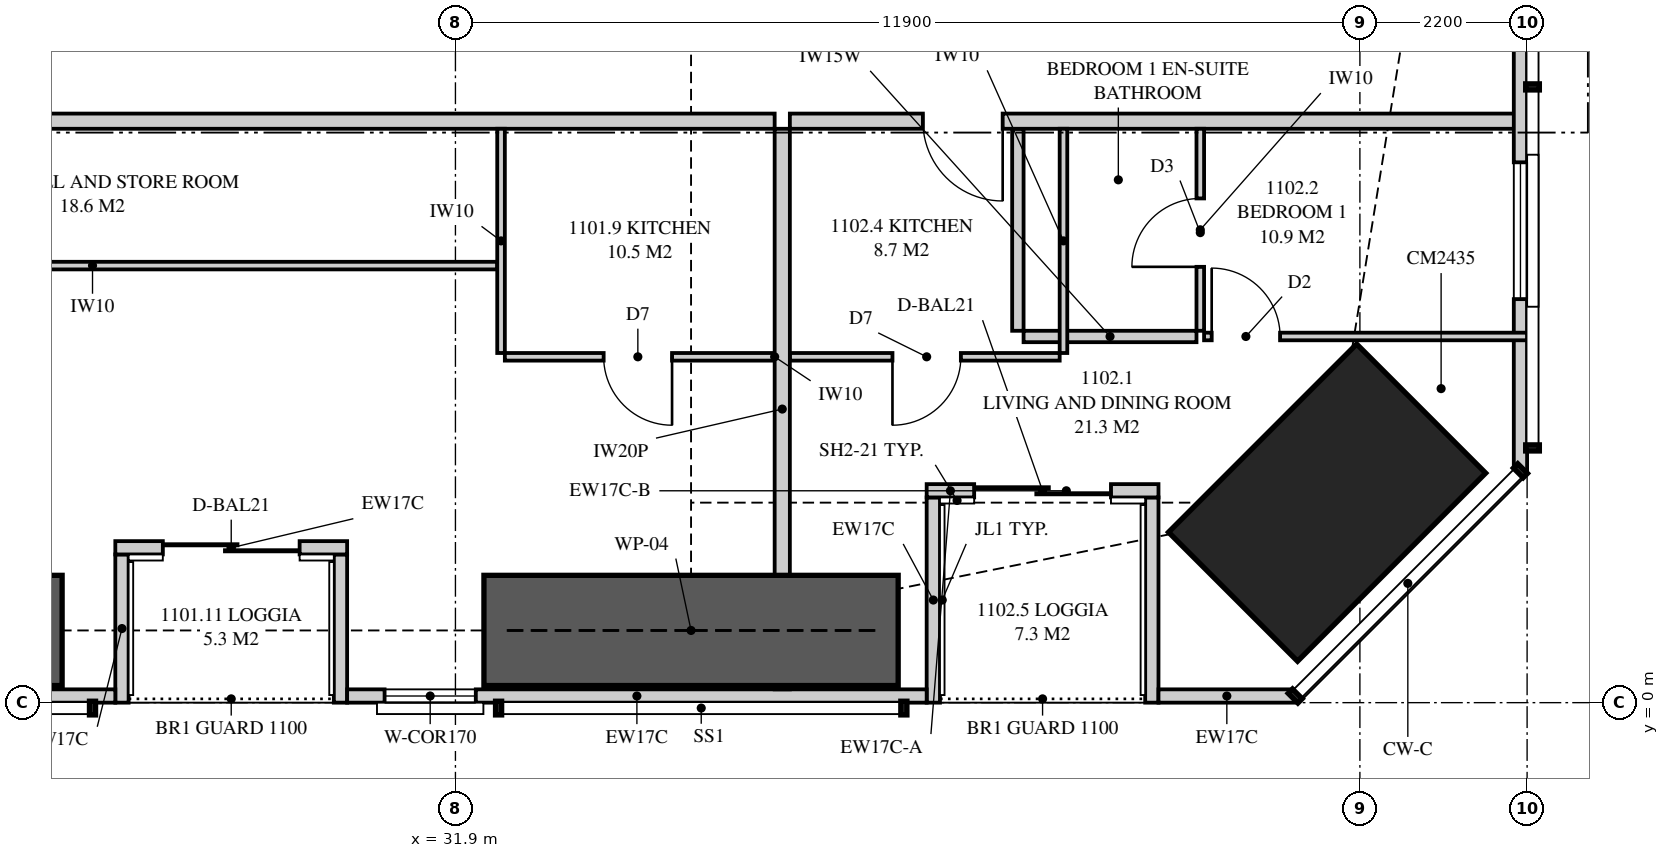
"""IFC4 building model, lengths in metres.
Left out: names, types, materials, properties, quantities, classifications, styles, units other than length and angle.
Written with IfcOpenShell. Run it as: python <this file> out.ifc"""

import sys

from ifc_helpers import new_model, si_unit, direction, frame, frame_2d, origin, origin_2d, place, context, subcontext, project, spatial, polyline, rectangle, outline, extrude, element, fill, save


model = new_model("IFC4")
c1 = context("Model", 3, precision=1e-05, world=origin(), true_north=direction((0.0, 1.0)))
c2 = subcontext(c1, "Body", "Model", "MODEL_VIEW")
j1 = project(units=[si_unit("LENGTHUNIT", "METRE"), si_unit("PLANEANGLEUNIT", "RADIAN")], contexts=[c1])
p1 = place(None, origin())
s1 = spatial("IfcSite", under=j1, at=p1, CompositionType="ELEMENT")
p2 = place(p1, origin())
s2 = spatial("IfcBuilding", under=s1, at=p2, CompositionType="ELEMENT")
p3 = place(p2, frame((0.0, 0.0, 44.45)))
s3 = spatial("IfcBuildingStorey", under=s2, at=p3, CompositionType="ELEMENT", Elevation=44.45)
p4 = place(p3, frame((43.369, 2.631, 0.0), z_axis=(0.0, 0.0, 1.0), x_axis=(-0.707106781187, 0.707106781187, 0.0)))
e1 = element("IfcColumn", 1, at=p4, inside=s3, PredefinedType="COLUMN", context=c2, shape_type="SweptSolid", body=[
    extrude(rectangle(XDim=2.4, YDim=3.5, at=origin_2d()), origin(), (0.0, 0.0, 1.0), 3.35),
])
p5 = place(p3, frame((5.051, 0.087, 0.0), z_axis=(0.0, 0.0, 1.0), x_axis=(1.0, 0.0, 0.0)))
e2 = element("IfcWall", 2, at=p5, inside=s3, PredefinedType="SOLIDWALL", context=c2, shape_type="SweptSolid", body=[
    extrude(outline(polyline([(0.0, 0.0), (22.374, 0.0), (22.374, 2.15), (7.949, 2.15), (7.949, 3.11), (7.793, 3.11), (7.793, 2.15), (7.745, 2.15), (7.745, 3.11), (0.0, 3.11), (0.0, 0.0)])), frame((0.0, 0.087, 0.0), z_axis=(0.0, -1.0, 0.0), x_axis=(1.0, 0.0, 0.0)), (0.0, 0.0, 1.0), 0.175),
])
p6 = place(p5, frame((3.319, 0.0, 0.4)))
e3 = element("IfcOpeningElement", 3, at=p6, cuts=e2, PredefinedType="OPENING", context=c2, shape_type="SweptSolid", body=[
    extrude(rectangle(XDim=1.8, YDim=1.7, at=frame_2d((0.9, 0.85))), frame((0.0, 0.097, 0.0), z_axis=(0.0, -1.0, 0.0), x_axis=(1.0, 0.0, 0.0)), (0.0, 0.0, 1.0), 0.195),
])
p7 = place(p5, frame((10.806, 0.0, 0.4)))
e4 = element("IfcOpeningElement", 4, at=p7, cuts=e2, PredefinedType="OPENING", context=c2, shape_type="SweptSolid", body=[
    extrude(rectangle(XDim=1.8, YDim=1.7, at=frame_2d((0.9, 0.85))), frame((0.0, 0.097, 0.0), z_axis=(0.0, -1.0, 0.0), x_axis=(1.0, 0.0, 0.0)), (0.0, 0.0, 1.0), 0.195),
])
p8 = place(p5, frame((13.974, 0.0, 0.4)))
e5 = element("IfcOpeningElement", 5, at=p8, cuts=e2, PredefinedType="OPENING", context=c2, shape_type="SweptSolid", body=[
    extrude(rectangle(XDim=1.8, YDim=1.7, at=frame_2d((0.9, 0.85))), frame((0.0, 0.097, 0.0), z_axis=(0.0, -1.0, 0.0), x_axis=(1.0, 0.0, 0.0)), (0.0, 0.0, 1.0), 0.195),
])
p9 = place(p3, frame((30.475, 0.087, 0.0), z_axis=(0.0, 0.0, 1.0), x_axis=(1.0, 0.0, 0.0)))
e6 = element("IfcWall", 6, at=p9, inside=s3, PredefinedType="SOLIDWALL", context=c2, shape_type="SweptSolid", body=[
    extrude(outline(polyline([(0.0, 0.0), (7.625, 0.0), (7.625, 3.11), (4.729, 3.11), (4.729, 2.15), (4.681, 2.15), (4.681, 3.11), (4.525, 3.11), (4.525, 2.15), (0.0, 2.15), (0.0, 0.0)])), frame((0.0, 0.087, 0.0), z_axis=(0.0, -1.0, 0.0), x_axis=(1.0, 0.0, 0.0)), (0.0, 0.0, 1.0), 0.175),
])
p10 = place(p9, frame((0.493, 0.0, 0.4)))
e7 = element("IfcOpeningElement", 7, at=p10, cuts=e6, PredefinedType="OPENING", context=c2, shape_type="SweptSolid", body=[
    extrude(rectangle(XDim=1.2, YDim=1.7, at=frame_2d((0.6, 0.85))), frame((0.0, 0.097, 0.0), z_axis=(0.0, -1.0, 0.0), x_axis=(1.0, 0.0, 0.0)), (0.0, 0.0, 1.0), 0.195),
])
p11 = place(p3, frame((41.15, 0.087, 0.0), z_axis=(0.0, 0.0, 1.0), x_axis=(1.0, 0.0, 0.0)))
e8 = element("IfcWall", 8, at=p11, inside=s3, PredefinedType="SOLIDWALL", context=c2, shape_type="SweptSolid", body=[
    extrude(rectangle(XDim=1.799, YDim=0.175, at=frame_2d((0.899, 0.0))), origin(), (0.0, 0.0, 1.0), 3.11),
])
p12 = place(p3, frame((27.425, 2.038, 0.0), z_axis=(0.0, 0.0, 1.0), x_axis=(1.0, 0.0, 0.0)))
e9 = element("IfcWall", 9, at=p12, inside=s3, PredefinedType="SOLIDWALL", context=c2, shape_type="SweptSolid", body=[
    extrude(rectangle(XDim=3.05, YDim=0.175, at=frame_2d((1.525, 0.0))), origin(), (0.0, 0.0, 1.0), 3.11),
])
p13 = place(p12, frame((0.625, 0.0, 0.0)))
e10 = element("IfcOpeningElement", 10, at=p13, cuts=e9, PredefinedType="OPENING", context=c2, shape_type="SweptSolid", body=[
    extrude(rectangle(XDim=1.8, YDim=2.1, at=frame_2d((0.9, 1.05))), frame((0.0, 0.097, 0.0), z_axis=(0.0, -1.0, 0.0), x_axis=(1.0, 0.0, 0.0)), (0.0, 0.0, 1.0), 0.195),
])
for number, where, z_axis, x_axis in (
    (11, (27.512, 0.0, 0.0), (0.0, 0.0, 1.0), (0.0, 1.0, 0.0)),
    (12, (30.387, 0.0, 0.0), (0.0, 0.0, 1.0), (0.0, 1.0, 0.0)),
):
    element("IfcWall", number, at=place(p3, frame(where, z_axis=z_axis, x_axis=x_axis)), inside=s3, PredefinedType="SOLIDWALL", context=c2, shape_type="SweptSolid", body=[
        extrude(outline(polyline([(0.0, 0.0), (1.95, 0.0), (1.95, 3.11), (1.75, 3.11), (1.75, 2.15), (0.15, 2.15), (0.15, 3.11), (0.0, 3.11), (0.0, 0.0)])), frame((0.0, 0.087, 0.0), z_axis=(0.0, -1.0, 0.0), x_axis=(1.0, 0.0, 0.0)), (0.0, 0.0, 1.0), 0.175),
    ])
p14 = place(p3, frame((38.1, 2.788, 0.0), z_axis=(0.0, 0.0, 1.0), x_axis=(1.0, 0.0, 0.0)))
e13 = element("IfcWall", 13, at=p14, inside=s3, PredefinedType="SOLIDWALL", context=c2, shape_type="SweptSolid", body=[
    extrude(rectangle(XDim=0.625, YDim=0.175, at=frame_2d((0.312, 0.0))), origin(), (0.0, 0.0, 1.0), 2.51),
])
p15 = place(p3, frame((38.725, 2.788, 0.0), z_axis=(0.0, 0.0, 1.0), x_axis=(1.0, 0.0, 0.0)))
e14 = element("IfcWall", 14, at=p15, inside=s3, PredefinedType="SOLIDWALL", context=c2, shape_type="SweptSolid", body=[
    extrude(rectangle(XDim=2.425, YDim=0.175, at=frame_2d((1.212, 0.0))), origin(), (0.0, 0.0, 1.0), 2.15),
])
p16 = place(p15, origin())
e15 = element("IfcOpeningElement", 15, at=p16, cuts=e14, PredefinedType="OPENING", context=c2, shape_type="SweptSolid", body=[
    extrude(rectangle(XDim=1.8, YDim=2.1, at=frame_2d((0.9, 1.05))), frame((0.0, 0.097, 0.0), z_axis=(0.0, -1.0, 0.0), x_axis=(1.0, 0.0, 0.0)), (0.0, 0.0, 1.0), 0.195),
])
p17 = place(p3, frame((38.188, 0.0, 0.0), z_axis=(0.0, 0.0, 1.0), x_axis=(0.0, 1.0, 0.0)))
e16 = element("IfcWall", 16, at=p17, inside=s3, PredefinedType="SOLIDWALL", context=c2, shape_type="SweptSolid", body=[
    extrude(outline(polyline([(0.0, 0.0), (2.7, 0.0), (2.7, 2.51), (2.424, 2.51), (2.424, 2.15), (0.757, 2.15), (0.757, 3.11), (0.0, 3.11), (0.0, 0.0)])), frame((0.0, 0.087, 0.0), z_axis=(0.0, -1.0, 0.0), x_axis=(1.0, 0.0, 0.0)), (0.0, 0.0, 1.0), 0.175),
])
p18 = place(p3, frame((41.062, 0.0, 0.0), z_axis=(0.0, 0.0, 1.0), x_axis=(0.0, 1.0, 0.0)))
e17 = element("IfcWall", 17, at=p18, inside=s3, PredefinedType="SOLIDWALL", context=c2, shape_type="SweptSolid", body=[
    extrude(outline(polyline([(0.0, 0.0), (2.7, 0.0), (2.7, 2.15), (1.334, 2.15), (1.334, 3.11), (0.0, 3.11), (0.0, 0.0)])), frame((0.0, 0.087, 0.0), z_axis=(0.0, -1.0, 0.0), x_axis=(1.0, 0.0, 0.0)), (0.0, 0.0, 1.0), 0.175),
])
p19 = place(p3, frame((45.913, 3.051, 0.0), z_axis=(0.0, 0.0, 1.0), x_axis=(0.0, 1.0, 0.0)))
e18 = element("IfcWall", 18, at=p19, inside=s3, PredefinedType="SOLIDWALL", context=c2, shape_type="SweptSolid", body=[
    extrude(outline(polyline([(0.0, 0.0), (31.897, 0.0), (31.897, 3.11), (22.167, 3.11), (22.167, 2.15), (22.074, 2.15), (22.074, 3.11), (21.949, 3.11), (21.949, 2.15), (9.949, 2.15), (9.949, 3.11), (9.823, 3.11), (9.823, 2.15), (9.73, 2.15), (9.73, 3.11), (0.0, 3.11), (0.0, 0.0)])), frame((0.0, 0.087, 0.0), z_axis=(0.0, -1.0, 0.0), x_axis=(1.0, 0.0, 0.0)), (0.0, 0.0, 1.0), 0.175),
])
p20 = place(p19, frame((2.257, 0.0, 0.4)))
e19 = element("IfcOpeningElement", 19, at=p20, cuts=e18, PredefinedType="OPENING", context=c2, shape_type="SweptSolid", body=[
    extrude(rectangle(XDim=1.8, YDim=1.7, at=frame_2d((0.9, 0.85))), frame((0.0, 0.097, 0.0), z_axis=(0.0, -1.0, 0.0), x_axis=(1.0, 0.0, 0.0)), (0.0, 0.0, 1.0), 0.195),
])
p21 = place(p19, frame((14.849, 0.0, 0.4)))
e20 = element("IfcOpeningElement", 20, at=p21, cuts=e18, PredefinedType="OPENING", context=c2, shape_type="SweptSolid", body=[
    extrude(rectangle(XDim=1.2, YDim=1.7, at=frame_2d((0.6, 0.85))), frame((0.0, 0.097, 0.0), z_axis=(0.0, -1.0, 0.0), x_axis=(1.0, 0.0, 0.0)), (0.0, 0.0, 1.0), 0.195),
])
p22 = place(p19, frame((27.34, 0.0, 0.4)))
e21 = element("IfcOpeningElement", 21, at=p22, cuts=e18, PredefinedType="OPENING", context=c2, shape_type="SweptSolid", body=[
    extrude(rectangle(XDim=1.8, YDim=1.7, at=frame_2d((0.9, 0.85))), frame((0.0, 0.097, 0.0), z_axis=(0.0, -1.0, 0.0), x_axis=(1.0, 0.0, 0.0)), (0.0, 0.0, 1.0), 0.195),
])
p23 = place(p3, frame((36.2, 0.175, 0.0), z_axis=(0.0, 0.0, 1.0), x_axis=(0.0, 1.0, 0.0)))
e22 = element("IfcWall", 22, at=p23, inside=s3, PredefinedType="PARTITIONING", context=c2, shape_type="SweptSolid", body=[
    extrude(outline(polyline([(0.088, 3.11), (0.0, 3.11), (0.0, 0.0), (0.529, 0.0), (0.529, 0.677), (1.021, 0.677), (1.021, 0.0), (7.375, 0.0), (7.375, 3.11), (3.766, 3.11), (3.766, 2.51), (1.944, 2.51), (1.944, 2.15), (1.021, 2.15), (1.021, 1.473), (0.529, 1.473), (0.529, 2.15), (0.088, 2.15), (0.088, 3.11)])), frame((0.0, 0.1, 0.0), z_axis=(0.0, -1.0, 0.0), x_axis=(1.0, 0.0, 0.0)), (0.0, 0.0, 1.0), 0.2),
])
p24 = place(p3, frame((17.725, 7.65, 0.0), z_axis=(0.0, 0.0, 1.0), x_axis=(1.0, 0.0, 0.0)))
e23 = element("IfcWall", 23, at=p24, inside=s3, PredefinedType="PARTITIONING", context=c2, shape_type="SweptSolid", body=[
    extrude(outline(polyline([(0.0, 0.0), (18.375, 0.0), (18.375, 3.11), (17.612, 3.11), (17.612, 2.541), (16.938, 2.541), (16.938, 3.11), (6.612, 3.11), (6.612, 2.541), (5.938, 2.541), (5.938, 3.11), (0.0, 3.11), (0.0, 0.0)])), frame((0.0, 0.1, 0.0), z_axis=(0.0, -1.0, 0.0), x_axis=(1.0, 0.0, 0.0)), (0.0, 0.0, 1.0), 0.2),
])
p25 = place(p24, frame((0.875, 0.0, 0.0)))
e24 = element("IfcOpeningElement", 24, at=p25, cuts=e23, PredefinedType="OPENING", context=c2, shape_type="SweptSolid", body=[
    extrude(rectangle(XDim=1.05, YDim=2.2, at=frame_2d((0.525, 1.1))), frame((0.0, 0.11, 0.0), z_axis=(0.0, -1.0, 0.0), x_axis=(1.0, 0.0, 0.0)), (0.0, 0.0, 1.0), 0.22),
])
p26 = place(p3, frame((32.55, 4.55, 0.0), z_axis=(0.0, 0.0, 1.0), x_axis=(1.0, 0.0, 0.0)))
e25 = element("IfcWall", 25, at=p26, inside=s3, PredefinedType="PARTITIONING", context=c2, shape_type="SweptSolid", body=[
    extrude(outline(polyline([(0.0, 0.0), (3.55, 0.0), (3.55, 3.11), (2.737, 3.11), (2.737, 2.541), (2.163, 2.541), (2.163, 3.11), (0.0, 3.11), (0.0, 0.0)])), frame((0.0, 0.05, 0.0), z_axis=(0.0, -1.0, 0.0), x_axis=(1.0, 0.0, 0.0)), (0.0, 0.0, 1.0), 0.1),
])
p27 = place(p26, frame((1.3, 0.0, 0.0)))
e26 = element("IfcOpeningElement", 26, at=p27, cuts=e25, PredefinedType="OPENING", context=c2, shape_type="SweptSolid", body=[
    extrude(rectangle(XDim=0.9, YDim=2.1, at=frame_2d((0.45, 1.05))), frame((0.0, 0.06, 0.0), z_axis=(0.0, -1.0, 0.0), x_axis=(1.0, 0.0, 0.0)), (0.0, 0.0, 1.0), 0.12),
])
p28 = place(p3, frame((32.5, 4.6, 0.0), z_axis=(0.0, 0.0, 1.0), x_axis=(0.0, 1.0, 0.0)))
e27 = element("IfcWall", 27, at=p28, inside=s3, PredefinedType="PARTITIONING", context=c2, shape_type="SweptSolid", body=[
    extrude(rectangle(XDim=2.95, YDim=0.1, at=frame_2d((1.475, 0.0))), origin(), (0.0, 0.0, 1.0), 3.11),
])
p29 = place(p3, frame((21.8, 5.75, 0.0), z_axis=(0.0, 0.0, 1.0), x_axis=(1.0, 0.0, 0.0)))
e28 = element("IfcWall", 28, at=p29, inside=s3, PredefinedType="PARTITIONING", context=c2, shape_type="SweptSolid", body=[
    extrude(outline(polyline([(0.0, 0.0), (10.65, 0.0), (10.65, 3.11), (2.487, 3.11), (2.487, 2.541), (1.913, 2.541), (1.913, 3.11), (0.0, 3.11), (0.0, 0.0)])), frame((0.0, 0.05, 0.0), z_axis=(0.0, -1.0, 0.0), x_axis=(1.0, 0.0, 0.0)), (0.0, 0.0, 1.0), 0.1),
])
p30 = place(p29, frame((0.3, 0.0, 0.0)))
e29 = element("IfcOpeningElement", 29, at=p30, cuts=e28, PredefinedType="OPENING", context=c2, shape_type="SweptSolid", body=[
    extrude(rectangle(XDim=1.0, YDim=2.1, at=frame_2d((0.5, 1.05))), frame((0.0, 0.06, 0.0), z_axis=(0.0, -1.0, 0.0), x_axis=(1.0, 0.0, 0.0)), (0.0, 0.0, 1.0), 0.12),
])
p31 = place(p3, frame((36.3, 7.65, 0.0), z_axis=(0.0, 0.0, 1.0), x_axis=(1.0, 0.0, 0.0)))
e30 = element("IfcWall", 30, at=p31, inside=s3, PredefinedType="PARTITIONING", context=c2, shape_type="SweptSolid", body=[
    extrude(outline(polyline([(0.0, 0.0), (9.7, 0.0), (9.7, 3.11), (8.804, 3.11), (8.804, 2.15), (6.96, 2.15), (6.96, 3.11), (0.0, 3.11), (0.0, 0.0)])), frame((0.0, 0.1, 0.0), z_axis=(0.0, -1.0, 0.0), x_axis=(1.0, 0.0, 0.0)), (0.0, 0.0, 1.0), 0.2),
])
p32 = place(p31, frame((1.75, 0.0, 0.0)))
e31 = element("IfcOpeningElement", 31, at=p32, cuts=e30, PredefinedType="OPENING", context=c2, shape_type="SweptSolid", body=[
    extrude(rectangle(XDim=1.05, YDim=2.2, at=frame_2d((0.525, 1.1))), frame((0.0, 0.11, 0.0), z_axis=(0.0, -1.0, 0.0), x_axis=(1.0, 0.0, 0.0)), (0.0, 0.0, 1.0), 0.22),
])
p33 = place(p3, frame((41.7, 4.892, 0.0), z_axis=(0.0, 0.0, 1.0), x_axis=(0.0, 1.0, 0.0)))
e32 = element("IfcWall", 32, at=p33, inside=s3, PredefinedType="PARTITIONING", context=c2, shape_type="SweptSolid", body=[
    extrude(rectangle(XDim=2.658, YDim=0.1, at=frame_2d((1.329, 0.0))), origin(), (0.0, 0.0, 1.0), 3.11),
])
p34 = place(p33, frame((0.841, 0.0, 0.0)))
e33 = element("IfcOpeningElement", 33, at=p34, cuts=e32, PredefinedType="OPENING", context=c2, shape_type="SweptSolid", body=[
    extrude(rectangle(XDim=0.9, YDim=2.1, at=frame_2d((0.45, 1.05))), frame((0.0, 0.06, 0.0), z_axis=(0.0, -1.0, 0.0), x_axis=(1.0, 0.0, 0.0)), (0.0, 0.0, 1.0), 0.12),
])
p35 = place(p3, frame((41.75, 4.817, 0.0), z_axis=(0.0, 0.0, 1.0), x_axis=(1.0, 0.0, 0.0)))
e34 = element("IfcWall", 34, at=p35, inside=s3, PredefinedType="PARTITIONING", context=c2, shape_type="SweptSolid", body=[
    extrude(outline(polyline([(0.0, 0.0), (4.25, 0.0), (4.25, 3.11), (2.844, 3.11), (2.844, 2.15), (1.102, 2.15), (1.102, 3.11), (0.0, 3.11), (0.0, 0.0)])), frame((0.0, 0.05, 0.0), z_axis=(0.0, -1.0, 0.0), x_axis=(1.0, 0.0, 0.0)), (0.0, 0.0, 1.0), 0.1),
])
p36 = place(p35, frame((0.1, 0.0, 0.0)))
e35 = element("IfcOpeningElement", 35, at=p36, cuts=e34, PredefinedType="OPENING", context=c2, shape_type="SweptSolid", body=[
    extrude(rectangle(XDim=0.9, YDim=2.1, at=frame_2d((0.45, 1.05))), frame((0.0, 0.06, 0.0), z_axis=(0.0, -1.0, 0.0), x_axis=(1.0, 0.0, 0.0)), (0.0, 0.0, 1.0), 0.12),
])
p37 = place(p3, frame((39.375, 4.817, 0.0), z_axis=(0.0, 0.0, 1.0), x_axis=(1.0, 0.0, 0.0)))
e36 = element("IfcWall", 36, at=p37, inside=s3, PredefinedType="PLUMBINGWALL", context=c2, shape_type="SweptSolid", body=[
    extrude(rectangle(XDim=2.275, YDim=0.15, at=frame_2d((1.137, 0.0))), origin(), (0.0, 0.0, 1.0), 3.11),
])
p38 = place(p3, frame((39.3, 4.892, 0.0), z_axis=(0.0, 0.0, 1.0), x_axis=(0.0, 1.0, 0.0)))
e37 = element("IfcWall", 37, at=p38, inside=s3, PredefinedType="PLUMBINGWALL", context=c2, shape_type="SweptSolid", body=[
    extrude(rectangle(XDim=2.658, YDim=0.15, at=frame_2d((1.329, 0.0))), origin(), (0.0, 0.0, 1.0), 3.11),
])
p39 = place(p3, frame((36.3, 4.55, 0.0), z_axis=(0.0, 0.0, 1.0), x_axis=(1.0, 0.0, 0.0)))
e38 = element("IfcWall", 38, at=p39, inside=s3, PredefinedType="PARTITIONING", context=c2, shape_type="SweptSolid", body=[
    extrude(rectangle(XDim=3.55, YDim=0.1, at=frame_2d((1.775, 0.0))), origin(), (0.0, 0.0, 1.0), 3.11),
])
p40 = place(p39, frame((1.35, 0.0, 0.0)))
e39 = element("IfcOpeningElement", 39, at=p40, cuts=e38, PredefinedType="OPENING", context=c2, shape_type="SweptSolid", body=[
    extrude(rectangle(XDim=0.9, YDim=2.1, at=frame_2d((0.45, 1.05))), frame((0.0, 0.06, 0.0), z_axis=(0.0, -1.0, 0.0), x_axis=(1.0, 0.0, 0.0)), (0.0, 0.0, 1.0), 0.12),
])
p41 = place(p3, frame((39.9, 4.6, 0.0), z_axis=(0.0, 0.0, 1.0), x_axis=(0.0, 1.0, 0.0)))
e40 = element("IfcWall", 40, at=p41, inside=s3, PredefinedType="PARTITIONING", context=c2, shape_type="SweptSolid", body=[
    extrude(rectangle(XDim=2.95, YDim=0.1, at=frame_2d((1.475, 0.0))), origin(), (0.0, 0.0, 1.0), 3.11),
])
for number, where, z_axis, x_axis in (
    (41, (21.275, 0.95, 0.0), (0.0, 0.0, 1.0), (1.0, 0.0, 0.0)),
    (42, (32.275, 0.95, 0.0), (0.0, 0.0, 1.0), (1.0, 0.0, 0.0)),
):
    element("IfcWall", number, at=place(p3, frame(where, z_axis=z_axis, x_axis=x_axis)), inside=s3, PredefinedType="SHEAR", context=c2, shape_type="SweptSolid", body=[
        extrude(rectangle(XDim=5.45, YDim=1.45, at=frame_2d((2.725, 0.0))), origin(), (0.0, 0.0, 1.0), 3.35),
    ])
p42 = place(p13, origin())
e43 = element("IfcDoor", 43, at=p42, inside=s3, OperationType="SLIDING_TO_LEFT", PredefinedType="DOOR", context=c2, shape_type="SweptSolid", body=[
    extrude(rectangle(XDim=1.8, YDim=2.1, at=frame_2d((0.9, 1.05))), frame((0.0, 0.025, 0.0), z_axis=(0.0, -1.0, 0.0), x_axis=(1.0, 0.0, 0.0)), (0.0, 0.0, 1.0), 0.05),
])
fill(e10, e43)
p43 = place(p10, origin())
e44 = element("IfcWindow", 44, at=p43, inside=s3, PartitioningType="SINGLE_PANEL", PredefinedType="WINDOW", context=c2, shape_type="SweptSolid", body=[
    extrude(rectangle(XDim=1.2, YDim=1.7, at=frame_2d((0.6, 0.85))), frame((0.0, 0.03, 0.0), z_axis=(0.0, -1.0, 0.0), x_axis=(1.0, 0.0, 0.0)), (0.0, 0.0, 1.0), 0.06),
])
fill(e7, e44)
p44 = place(p16, origin())
e45 = element("IfcDoor", 45, at=p44, inside=s3, OperationType="SLIDING_TO_LEFT", PredefinedType="DOOR", context=c2, shape_type="SweptSolid", body=[
    extrude(rectangle(XDim=1.8, YDim=2.1, at=frame_2d((0.9, 1.05))), frame((0.0, 0.025, 0.0), z_axis=(0.0, -1.0, 0.0), x_axis=(1.0, 0.0, 0.0)), (0.0, 0.0, 1.0), 0.05),
])
fill(e15, e45)
p45 = place(p20, origin())
e46 = element("IfcWindow", 46, at=p45, inside=s3, PartitioningType="SINGLE_PANEL", PredefinedType="WINDOW", context=c2, shape_type="SweptSolid", body=[
    extrude(rectangle(XDim=1.8, YDim=1.7, at=frame_2d((0.9, 0.85))), frame((0.0, 0.03, 0.0), z_axis=(0.0, -1.0, 0.0), x_axis=(1.0, 0.0, 0.0)), (0.0, 0.0, 1.0), 0.06),
])
fill(e19, e46)
p46 = place(p27, frame((0.9, 0.0, 0.0), z_axis=(0.0, 0.0, 1.0), x_axis=(-1.0, 0.0, 0.0)))
e47 = element("IfcDoor", 47, at=p46, inside=s3, OperationType="SINGLE_SWING_LEFT", PredefinedType="DOOR", context=c2, shape_type="SweptSolid", body=[
    extrude(rectangle(XDim=0.9, YDim=2.1, at=frame_2d((0.45, 1.05))), frame((0.0, 0.025, 0.0), z_axis=(0.0, -1.0, 0.0), x_axis=(1.0, 0.0, 0.0)), (0.0, 0.0, 1.0), 0.05),
])
fill(e26, e47)
p47 = place(p32, frame((1.05, 0.0, 0.0), z_axis=(0.0, 0.0, 1.0), x_axis=(-1.0, 0.0, 0.0)))
e48 = element("IfcDoor", 48, at=p47, inside=s3, OperationType="SINGLE_SWING_LEFT", PredefinedType="DOOR", context=c2, shape_type="SweptSolid", body=[
    extrude(rectangle(XDim=1.05, YDim=2.2, at=frame_2d((0.525, 1.1))), frame((0.0, 0.025, 0.0), z_axis=(0.0, -1.0, 0.0), x_axis=(1.0, 0.0, 0.0)), (0.0, 0.0, 1.0), 0.05),
])
fill(e31, e48)
p48 = place(p36, origin())
e49 = element("IfcDoor", 49, at=p48, inside=s3, OperationType="SINGLE_SWING_LEFT", PredefinedType="DOOR", context=c2, shape_type="SweptSolid", body=[
    extrude(rectangle(XDim=0.9, YDim=2.1, at=frame_2d((0.45, 1.05))), frame((0.0, 0.025, 0.0), z_axis=(0.0, -1.0, 0.0), x_axis=(1.0, 0.0, 0.0)), (0.0, 0.0, 1.0), 0.05),
])
fill(e35, e49)
p49 = place(p34, origin())
e50 = element("IfcDoor", 50, at=p49, inside=s3, OperationType="SINGLE_SWING_LEFT", PredefinedType="DOOR", context=c2, shape_type="SweptSolid", body=[
    extrude(rectangle(XDim=0.9, YDim=2.1, at=frame_2d((0.45, 1.05))), frame((0.0, 0.025, 0.0), z_axis=(0.0, -1.0, 0.0), x_axis=(1.0, 0.0, 0.0)), (0.0, 0.0, 1.0), 0.05),
])
fill(e33, e50)
p50 = place(p40, frame((0.9, 0.0, 0.0), z_axis=(0.0, 0.0, 1.0), x_axis=(-1.0, 0.0, 0.0)))
e51 = element("IfcDoor", 51, at=p50, inside=s3, OperationType="SINGLE_SWING_RIGHT", PredefinedType="DOOR", context=c2, shape_type="SweptSolid", body=[
    extrude(rectangle(XDim=0.9, YDim=2.1, at=frame_2d((0.45, 1.05))), frame((0.0, 0.025, 0.0), z_axis=(0.0, -1.0, 0.0), x_axis=(1.0, 0.0, 0.0)), (0.0, 0.0, 1.0), 0.05),
])
fill(e39, e51)
save(model, sys.argv[1])
